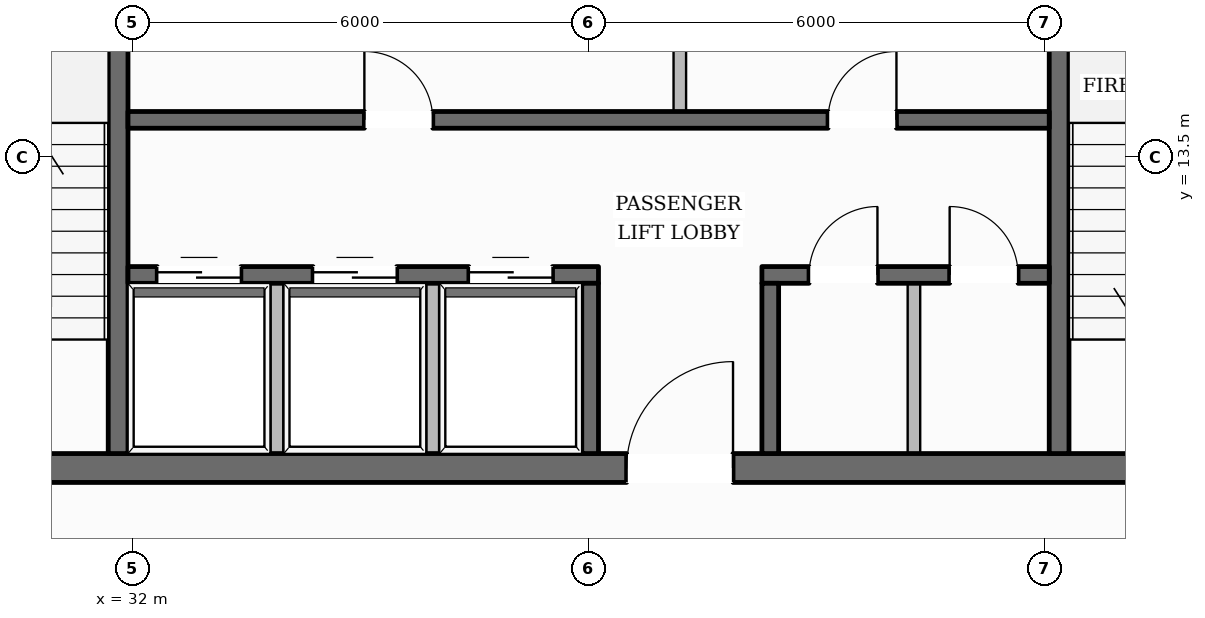
"""IFC4 building model, lengths in metres.
Left out: names, types, materials, properties, quantities, classifications, styles, units other than length and angle.
Written with IfcOpenShell. Run it as: python <this file> out.ifc"""

import sys

from ifc_helpers import new_model, si_unit, direction, frame, frame_2d, origin, place, context, subcontext, project, spatial, rectangle, extrude, element, fill, save


model = new_model("IFC4")
c1 = context("Model", 3, precision=1e-05, world=origin(), true_north=direction((0.0, 1.0)))
c2 = subcontext(c1, "Body", "Model", "MODEL_VIEW")
j1 = project(units=[si_unit("LENGTHUNIT", "METRE"), si_unit("PLANEANGLEUNIT", "RADIAN")], contexts=[c1])
p1 = place(None, origin())
s1 = spatial("IfcSite", under=j1, at=p1, CompositionType="ELEMENT")
p2 = place(p1, origin())
s2 = spatial("IfcBuilding", under=s1, at=p2, CompositionType="ELEMENT")
p3 = place(p2, frame((0.0, 0.0, 258.75)))
s3 = spatial("IfcBuildingStorey", under=s2, at=p3, CompositionType="ELEMENT", Elevation=258.75)
p4 = place(p3, frame((28.1, 9.41, 0.0), z_axis=(0.0, 0.0, 1.0), x_axis=(1.0, 0.0, 0.0)))
e1 = element("IfcWall", 1, at=p4, inside=s3, PredefinedType="SOLIDWALL", context=c2, shape_type="SweptSolid", body=[
    extrude(rectangle(XDim=19.8, YDim=0.38, at=frame_2d((9.9, 0.0))), origin(), (0.0, 0.0, 1.0), 3.61),
])
p5 = place(p4, frame((10.4, 0.0, 0.0)))
e2 = element("IfcOpeningElement", 2, at=p5, cuts=e1, PredefinedType="OPENING", context=c2, shape_type="SweptSolid", body=[
    extrude(rectangle(XDim=1.4, YDim=2.2, at=frame_2d((0.7, 1.1))), frame((0.0, 0.2, 0.0), z_axis=(0.0, -1.0, 0.0), x_axis=(1.0, 0.0, 0.0)), (0.0, 0.0, 1.0), 0.4),
])
p6 = place(p3, frame((31.81, 9.6, 0.0), z_axis=(0.0, 0.0, 1.0), x_axis=(0.0, 1.0, 0.0)))
e3 = element("IfcWall", 3, at=p6, inside=s3, PredefinedType="SHEAR", context=c2, shape_type="SweptSolid", body=[
    extrude(rectangle(XDim=13.0, YDim=0.26, at=frame_2d((6.5, 0.0))), origin(), (0.0, 0.0, 1.0), 3.61),
])
p7 = place(p6, frame((10.925, 0.0, 0.0)))
e4 = element("IfcOpeningElement", 4, at=p7, cuts=e3, PredefinedType="OPENING", context=c2, shape_type="SweptSolid", body=[
    extrude(rectangle(XDim=1.25, YDim=2.25, at=frame_2d((0.625, 1.125))), frame((0.0, 0.14, 0.0), z_axis=(0.0, -1.0, 0.0), x_axis=(1.0, 0.0, 0.0)), (0.0, 0.0, 1.0), 0.28),
])
p8 = place(p3, frame((44.19, 9.6, 0.0), z_axis=(0.0, 0.0, 1.0), x_axis=(0.0, 1.0, 0.0)))
e5 = element("IfcWall", 5, at=p8, inside=s3, PredefinedType="SHEAR", context=c2, shape_type="SweptSolid", body=[
    extrude(rectangle(XDim=13.0, YDim=0.26, at=frame_2d((6.5, 0.0))), origin(), (0.0, 0.0, 1.0), 3.61),
])
p9 = place(p8, frame((10.925, 0.0, 0.0)))
e6 = element("IfcOpeningElement", 6, at=p9, cuts=e5, PredefinedType="OPENING", context=c2, shape_type="SweptSolid", body=[
    extrude(rectangle(XDim=1.25, YDim=2.25, at=frame_2d((0.625, 1.125))), frame((0.0, 0.14, 0.0), z_axis=(0.0, -1.0, 0.0), x_axis=(1.0, 0.0, 0.0)), (0.0, 0.0, 1.0), 0.28),
])
p10 = place(p3, frame((31.94, 13.99, 0.0), z_axis=(0.0, 0.0, 1.0), x_axis=(1.0, 0.0, 0.0)))
e7 = element("IfcWall", 7, at=p10, inside=s3, PredefinedType="SOLIDWALL", context=c2, shape_type="SweptSolid", body=[
    extrude(rectangle(XDim=12.12, YDim=0.22, at=frame_2d((6.06, 0.0))), origin(), (0.0, 0.0, 1.0), 3.61),
])
p11 = place(p10, frame((3.11, 0.0, 0.0)))
e8 = element("IfcOpeningElement", 8, at=p11, cuts=e7, PredefinedType="OPENING", context=c2, shape_type="SweptSolid", body=[
    extrude(rectangle(XDim=0.9, YDim=2.1, at=frame_2d((0.45, 1.05))), frame((0.0, 0.12, 0.0), z_axis=(0.0, -1.0, 0.0), x_axis=(1.0, 0.0, 0.0)), (0.0, 0.0, 1.0), 0.24),
])
p12 = place(p10, frame((9.21, 0.0, 0.0)))
e9 = element("IfcOpeningElement", 9, at=p12, cuts=e7, PredefinedType="OPENING", context=c2, shape_type="SweptSolid", body=[
    extrude(rectangle(XDim=0.9, YDim=2.1, at=frame_2d((0.45, 1.05))), frame((0.0, 0.12, 0.0), z_axis=(0.0, -1.0, 0.0), x_axis=(1.0, 0.0, 0.0)), (0.0, 0.0, 1.0), 0.24),
])
p13 = place(p3, frame((31.94, 11.95, 0.0), z_axis=(0.0, 0.0, 1.0), x_axis=(1.0, 0.0, 0.0)))
e10 = element("IfcWall", 10, at=p13, inside=s3, PredefinedType="SOLIDWALL", context=c2, shape_type="SweptSolid", body=[
    extrude(rectangle(XDim=6.19, YDim=0.22, at=frame_2d((3.095, 0.0))), origin(), (0.0, 0.0, 1.0), 3.61),
])
p14 = place(p13, frame((0.385, 0.0, 0.0)))
e11 = element("IfcOpeningElement", 11, at=p14, cuts=e10, PredefinedType="OPENING", context=c2, shape_type="SweptSolid", body=[
    extrude(rectangle(XDim=1.1, YDim=2.2, at=frame_2d((0.55, 1.1))), frame((0.0, 0.12, 0.0), z_axis=(0.0, -1.0, 0.0), x_axis=(1.0, 0.0, 0.0)), (0.0, 0.0, 1.0), 0.24),
])
p15 = place(p13, frame((2.435, 0.0, 0.0)))
e12 = element("IfcOpeningElement", 12, at=p15, cuts=e10, PredefinedType="OPENING", context=c2, shape_type="SweptSolid", body=[
    extrude(rectangle(XDim=1.1, YDim=2.2, at=frame_2d((0.55, 1.1))), frame((0.0, 0.12, 0.0), z_axis=(0.0, -1.0, 0.0), x_axis=(1.0, 0.0, 0.0)), (0.0, 0.0, 1.0), 0.24),
])
p16 = place(p13, frame((4.485, 0.0, 0.0)))
e13 = element("IfcOpeningElement", 13, at=p16, cuts=e10, PredefinedType="OPENING", context=c2, shape_type="SweptSolid", body=[
    extrude(rectangle(XDim=1.1, YDim=2.2, at=frame_2d((0.55, 1.1))), frame((0.0, 0.12, 0.0), z_axis=(0.0, -1.0, 0.0), x_axis=(1.0, 0.0, 0.0)), (0.0, 0.0, 1.0), 0.24),
])
p17 = place(p3, frame((40.28, 11.95, 0.0), z_axis=(0.0, 0.0, 1.0), x_axis=(1.0, 0.0, 0.0)))
e14 = element("IfcWall", 14, at=p17, inside=s3, PredefinedType="SOLIDWALL", context=c2, shape_type="SweptSolid", body=[
    extrude(rectangle(XDim=3.78, YDim=0.22, at=frame_2d((1.89, 0.0))), origin(), (0.0, 0.0, 1.0), 3.61),
])
p18 = place(p17, frame((0.62, 0.0, 0.0)))
e15 = element("IfcOpeningElement", 15, at=p18, cuts=e14, PredefinedType="OPENING", context=c2, shape_type="SweptSolid", body=[
    extrude(rectangle(XDim=0.9, YDim=2.1, at=frame_2d((0.45, 1.05))), frame((0.0, 0.12, 0.0), z_axis=(0.0, -1.0, 0.0), x_axis=(1.0, 0.0, 0.0)), (0.0, 0.0, 1.0), 0.24),
])
p19 = place(p17, frame((2.47, 0.0, 0.0)))
e16 = element("IfcOpeningElement", 16, at=p19, cuts=e14, PredefinedType="OPENING", context=c2, shape_type="SweptSolid", body=[
    extrude(rectangle(XDim=0.9, YDim=2.1, at=frame_2d((0.45, 1.05))), frame((0.0, 0.12, 0.0), z_axis=(0.0, -1.0, 0.0), x_axis=(1.0, 0.0, 0.0)), (0.0, 0.0, 1.0), 0.24),
])
for number, where, z_axis, x_axis in (
    (17, (38.02, 9.6, 0.0), (0.0, 0.0, 1.0), (0.0, 1.0, 0.0)),
    (18, (40.39, 9.6, 0.0), (0.0, 0.0, 1.0), (0.0, 1.0, 0.0)),
):
    element("IfcWall", number, at=place(p3, frame(where, z_axis=z_axis, x_axis=x_axis)), inside=s3, PredefinedType="SOLIDWALL", context=c2, shape_type="SweptSolid", body=[
        extrude(rectangle(XDim=2.24, YDim=0.22, at=frame_2d((1.12, 0.0))), origin(), (0.0, 0.0, 1.0), 3.61),
    ])
p20 = place(p3, frame((16.214, 11.135, 0.0), z_axis=(0.0, 0.0, 1.0), x_axis=(0.49510347201, 0.868834018673, 0.0)))
e19 = element("IfcWall", 19, at=p20, inside=s3, PredefinedType="STANDARD", context=c2, shape_type="SweptSolid", body=[
    extrude(rectangle(XDim=37.643, YDim=0.35, at=frame_2d((18.822, 0.0))), origin(), (0.0, 0.0, 1.0), 3.196),
])
p21 = place(p20, frame((33.429, 0.0, 0.65)))
e20 = element("IfcOpeningElement", 20, at=p21, cuts=e19, PredefinedType="OPENING", context=c2, shape_type="SweptSolid", body=[
    extrude(rectangle(XDim=1.35, YDim=1.75, at=frame_2d((0.675, 0.875))), frame((0.0, 0.185, 0.0), z_axis=(0.0, -1.0, 0.0), x_axis=(1.0, 0.0, 0.0)), (0.0, 0.0, 1.0), 0.37),
])
p22 = place(p20, frame((27.315, 0.0, 0.65)))
e21 = element("IfcOpeningElement", 21, at=p22, cuts=e19, PredefinedType="OPENING", context=c2, shape_type="SweptSolid", body=[
    extrude(rectangle(XDim=1.35, YDim=1.75, at=frame_2d((0.675, 0.875))), frame((0.0, 0.185, 0.0), z_axis=(0.0, -1.0, 0.0), x_axis=(1.0, 0.0, 0.0)), (0.0, 0.0, 1.0), 0.37),
])
p23 = place(p20, frame((15.087, 0.0, 0.65)))
e22 = element("IfcOpeningElement", 22, at=p23, cuts=e19, PredefinedType="OPENING", context=c2, shape_type="SweptSolid", body=[
    extrude(rectangle(XDim=1.35, YDim=1.75, at=frame_2d((0.675, 0.875))), frame((0.0, 0.185, 0.0), z_axis=(0.0, -1.0, 0.0), x_axis=(1.0, 0.0, 0.0)), (0.0, 0.0, 1.0), 0.37),
])
p24 = place(p20, frame((8.973, 0.0, 0.65)))
e23 = element("IfcOpeningElement", 23, at=p24, cuts=e19, PredefinedType="OPENING", context=c2, shape_type="SweptSolid", body=[
    extrude(rectangle(XDim=1.35, YDim=1.75, at=frame_2d((0.675, 0.875))), frame((0.0, 0.185, 0.0), z_axis=(0.0, -1.0, 0.0), x_axis=(1.0, 0.0, 0.0)), (0.0, 0.0, 1.0), 0.37),
])
p25 = place(p20, frame((2.859, 0.0, 0.65)))
e24 = element("IfcOpeningElement", 24, at=p25, cuts=e19, PredefinedType="OPENING", context=c2, shape_type="SweptSolid", body=[
    extrude(rectangle(XDim=1.35, YDim=1.75, at=frame_2d((0.675, 0.875))), frame((0.0, 0.185, 0.0), z_axis=(0.0, -1.0, 0.0), x_axis=(1.0, 0.0, 0.0)), (0.0, 0.0, 1.0), 0.37),
])
p26 = place(p3, frame((41.284, 43.76, 0.0), z_axis=(0.0, 0.0, 1.0), x_axis=(0.50479404613, -0.863239810824, 0.0)))
e25 = element("IfcWall", 25, at=p26, inside=s3, PredefinedType="STANDARD", context=c2, shape_type="SweptSolid", body=[
    extrude(rectangle(XDim=38.372, YDim=0.35, at=frame_2d((19.186, 0.0))), origin(), (0.0, 0.0, 1.0), 3.196),
])
p27 = place(p26, frame((34.102, 0.0, 0.65)))
e26 = element("IfcOpeningElement", 26, at=p27, cuts=e25, PredefinedType="OPENING", context=c2, shape_type="SweptSolid", body=[
    extrude(rectangle(XDim=1.35, YDim=1.75, at=frame_2d((0.675, 0.875))), frame((0.0, 0.185, 0.0), z_axis=(0.0, -1.0, 0.0), x_axis=(1.0, 0.0, 0.0)), (0.0, 0.0, 1.0), 0.37),
])
p28 = place(p26, frame((27.864, 0.0, 0.65)))
e27 = element("IfcOpeningElement", 27, at=p28, cuts=e25, PredefinedType="OPENING", context=c2, shape_type="SweptSolid", body=[
    extrude(rectangle(XDim=1.35, YDim=1.75, at=frame_2d((0.675, 0.875))), frame((0.0, 0.185, 0.0), z_axis=(0.0, -1.0, 0.0), x_axis=(1.0, 0.0, 0.0)), (0.0, 0.0, 1.0), 0.37),
])
p29 = place(p26, frame((15.39, 0.0, 0.65)))
e28 = element("IfcOpeningElement", 28, at=p29, cuts=e25, PredefinedType="OPENING", context=c2, shape_type="SweptSolid", body=[
    extrude(rectangle(XDim=1.35, YDim=1.75, at=frame_2d((0.675, 0.875))), frame((0.0, 0.185, 0.0), z_axis=(0.0, -1.0, 0.0), x_axis=(1.0, 0.0, 0.0)), (0.0, 0.0, 1.0), 0.37),
])
p30 = place(p26, frame((9.153, 0.0, 0.65)))
e29 = element("IfcOpeningElement", 29, at=p30, cuts=e25, PredefinedType="OPENING", context=c2, shape_type="SweptSolid", body=[
    extrude(rectangle(XDim=1.35, YDim=1.75, at=frame_2d((0.675, 0.875))), frame((0.0, 0.185, 0.0), z_axis=(0.0, -1.0, 0.0), x_axis=(1.0, 0.0, 0.0)), (0.0, 0.0, 1.0), 0.37),
])
p31 = place(p26, frame((2.915, 0.0, 0.65)))
e30 = element("IfcOpeningElement", 30, at=p31, cuts=e25, PredefinedType="OPENING", context=c2, shape_type="SweptSolid", body=[
    extrude(rectangle(XDim=1.35, YDim=1.75, at=frame_2d((0.675, 0.875))), frame((0.0, 0.185, 0.0), z_axis=(0.0, -1.0, 0.0), x_axis=(1.0, 0.0, 0.0)), (0.0, 0.0, 1.0), 0.37),
])
for number, where, z_axis, x_axis in (
    (31, (33.9, 9.49, 0.0), (0.0, 0.0, 1.0), (0.0, 1.0, 0.0)),
    (32, (35.95, 9.49, 0.0), (0.0, 0.0, 1.0), (0.0, 1.0, 0.0)),
):
    element("IfcWall", number, at=place(p3, frame(where, z_axis=z_axis, x_axis=x_axis)), inside=s3, PredefinedType="PARTITIONING", context=c2, shape_type="SweptSolid", body=[
        extrude(rectangle(XDim=2.35, YDim=0.165, at=frame_2d((1.175, 0.0))), origin(), (0.0, 0.0, 1.0), 3.61),
    ])
p32 = place(p3, frame((39.2, 14.1, 0.0), z_axis=(0.0, 0.0, 1.0), x_axis=(0.0, 1.0, 0.0)))
e33 = element("IfcWall", 33, at=p32, inside=s3, PredefinedType="PARTITIONING", context=c2, shape_type="SweptSolid", body=[
    extrude(rectangle(XDim=2.24, YDim=0.165, at=frame_2d((1.12, 0.0))), origin(), (0.0, 0.0, 1.0), 3.61),
])
p33 = place(p3, frame((42.28, 9.49, 0.0), z_axis=(0.0, 0.0, 1.0), x_axis=(0.0, 1.0, 0.0)))
e34 = element("IfcWall", 34, at=p33, inside=s3, PredefinedType="PARTITIONING", context=c2, shape_type="SweptSolid", body=[
    extrude(rectangle(XDim=2.35, YDim=0.165, at=frame_2d((1.175, 0.0))), origin(), (0.0, 0.0, 1.0), 3.61),
])
p34 = place(p5, origin())
e35 = element("IfcDoor", 35, at=p34, inside=s3, OperationType="SINGLE_SWING_RIGHT", PredefinedType="DOOR", context=c2, shape_type="SweptSolid", body=[
    extrude(rectangle(XDim=1.4, YDim=2.2, at=frame_2d((0.7, 1.1))), frame((0.0, 0.025, 0.0), z_axis=(0.0, -1.0, 0.0), x_axis=(1.0, 0.0, 0.0)), (0.0, 0.0, 1.0), 0.05),
])
fill(e2, e35)
p35 = place(p14, origin())
e36 = element("IfcDoor", 36, at=p35, inside=s3, OperationType="DOUBLE_DOOR_SLIDING", PredefinedType="DOOR", context=c2, shape_type="SweptSolid", body=[
    extrude(rectangle(XDim=1.1, YDim=2.2, at=frame_2d((0.55, 1.1))), frame((0.0, 0.025, 0.0), z_axis=(0.0, -1.0, 0.0), x_axis=(1.0, 0.0, 0.0)), (0.0, 0.0, 1.0), 0.05),
])
fill(e11, e36)
p36 = place(p15, origin())
e37 = element("IfcDoor", 37, at=p36, inside=s3, OperationType="DOUBLE_DOOR_SLIDING", PredefinedType="DOOR", context=c2, shape_type="SweptSolid", body=[
    extrude(rectangle(XDim=1.1, YDim=2.2, at=frame_2d((0.55, 1.1))), frame((0.0, 0.025, 0.0), z_axis=(0.0, -1.0, 0.0), x_axis=(1.0, 0.0, 0.0)), (0.0, 0.0, 1.0), 0.05),
])
fill(e12, e37)
p37 = place(p16, origin())
e38 = element("IfcDoor", 38, at=p37, inside=s3, OperationType="DOUBLE_DOOR_SLIDING", PredefinedType="DOOR", context=c2, shape_type="SweptSolid", body=[
    extrude(rectangle(XDim=1.1, YDim=2.2, at=frame_2d((0.55, 1.1))), frame((0.0, 0.025, 0.0), z_axis=(0.0, -1.0, 0.0), x_axis=(1.0, 0.0, 0.0)), (0.0, 0.0, 1.0), 0.05),
])
fill(e13, e38)
p38 = place(p11, origin())
e39 = element("IfcDoor", 39, at=p38, inside=s3, OperationType="SINGLE_SWING_LEFT", PredefinedType="DOOR", context=c2, shape_type="SweptSolid", body=[
    extrude(rectangle(XDim=0.9, YDim=2.1, at=frame_2d((0.45, 1.05))), frame((0.0, 0.025, 0.0), z_axis=(0.0, -1.0, 0.0), x_axis=(1.0, 0.0, 0.0)), (0.0, 0.0, 1.0), 0.05),
])
fill(e8, e39)
p39 = place(p12, origin())
e40 = element("IfcDoor", 40, at=p39, inside=s3, OperationType="SINGLE_SWING_RIGHT", PredefinedType="DOOR", context=c2, shape_type="SweptSolid", body=[
    extrude(rectangle(XDim=0.9, YDim=2.1, at=frame_2d((0.45, 1.05))), frame((0.0, 0.025, 0.0), z_axis=(0.0, -1.0, 0.0), x_axis=(1.0, 0.0, 0.0)), (0.0, 0.0, 1.0), 0.05),
])
fill(e9, e40)
p40 = place(p18, origin())
e41 = element("IfcDoor", 41, at=p40, inside=s3, OperationType="SINGLE_SWING_RIGHT", PredefinedType="DOOR", context=c2, shape_type="SweptSolid", body=[
    extrude(rectangle(XDim=0.9, YDim=2.1, at=frame_2d((0.45, 1.05))), frame((0.0, 0.025, 0.0), z_axis=(0.0, -1.0, 0.0), x_axis=(1.0, 0.0, 0.0)), (0.0, 0.0, 1.0), 0.05),
])
fill(e15, e41)
p41 = place(p19, origin())
e42 = element("IfcDoor", 42, at=p41, inside=s3, OperationType="SINGLE_SWING_LEFT", PredefinedType="DOOR", context=c2, shape_type="SweptSolid", body=[
    extrude(rectangle(XDim=0.9, YDim=2.1, at=frame_2d((0.45, 1.05))), frame((0.0, 0.025, 0.0), z_axis=(0.0, -1.0, 0.0), x_axis=(1.0, 0.0, 0.0)), (0.0, 0.0, 1.0), 0.05),
])
fill(e16, e42)
save(model, sys.argv[1])
